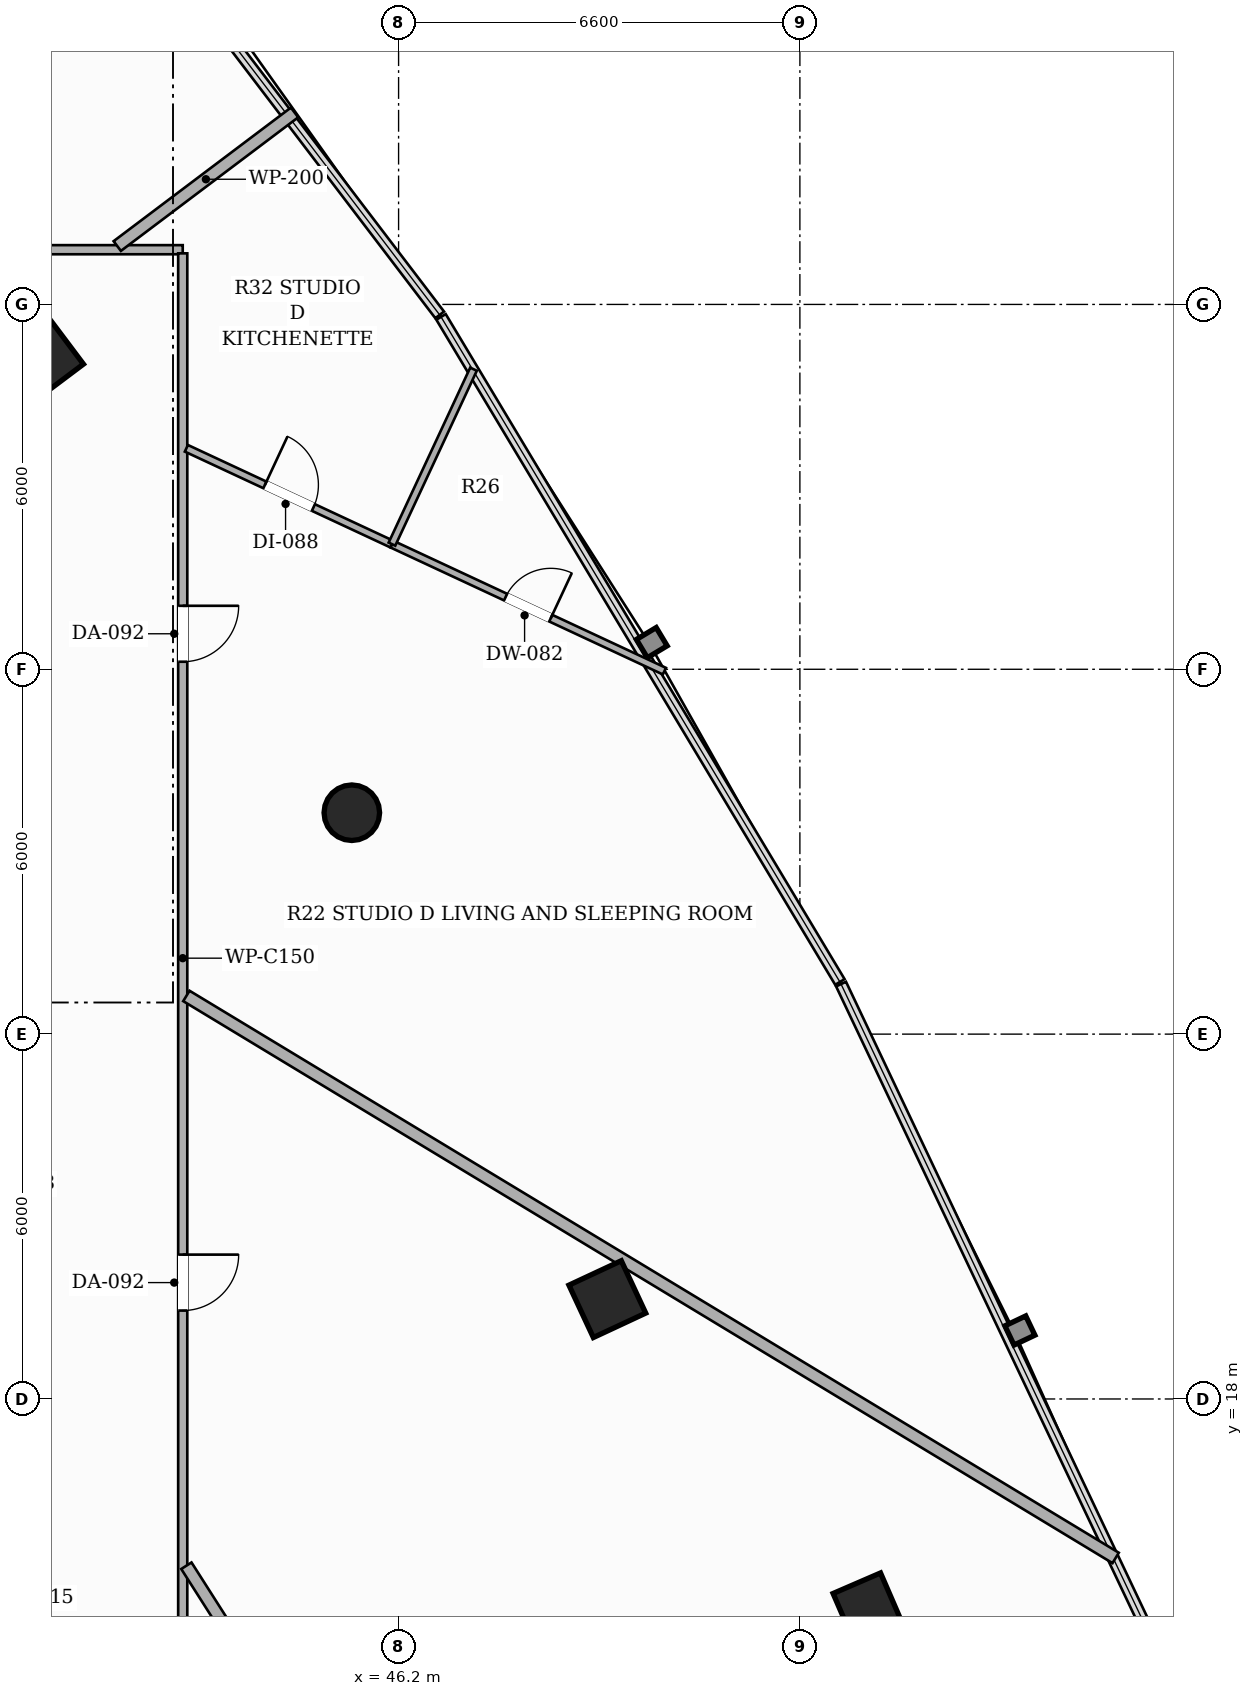
"""IFC4 building model, lengths in metres.
Left out: names, types, materials, properties, quantities, classifications, styles, units other than length and angle.
Written with IfcOpenShell. Run it as: python <this file> out.ifc"""

import sys

from ifc_helpers import new_model, si_unit, direction, frame, frame_2d, origin, origin_2d, place, context, subcontext, project, spatial, rectangle, hollow_rectangle, hollow_circle, extrude, element, fill, save


model = new_model("IFC4")
c1 = context("Model", 3, precision=1e-05, world=origin(), true_north=direction((0.0, 1.0)))
c2 = subcontext(c1, "Body", "Model", "MODEL_VIEW")
j1 = project(units=[si_unit("LENGTHUNIT", "METRE"), si_unit("PLANEANGLEUNIT", "RADIAN")], contexts=[c1])
p1 = place(None, origin())
s1 = spatial("IfcSite", under=j1, at=p1, CompositionType="ELEMENT")
p2 = place(p1, origin())
s2 = spatial("IfcBuilding", under=s1, at=p2, CompositionType="ELEMENT")
p3 = place(p2, frame((0.0, 0.0, 43.4)))
s3 = spatial("IfcBuildingStorey", under=s2, at=p3, CompositionType="ELEMENT", Elevation=43.4)
p4 = place(p3, frame((49.633, 19.642, 0.0), z_axis=(0.0, 0.0, 1.0), x_axis=(-0.422618261741, 0.906307787037, 0.0)))
e1 = element("IfcColumn", 1, at=p4, inside=s3, PredefinedType="COLUMN", context=c2, shape_type="SweptSolid", body=[
    extrude(hollow_rectangle(XDim=0.95, YDim=0.95, WallThickness=0.032, at=origin_2d()), origin(), (0.0, 0.0, 1.0), 3.3),
])
p5 = place(p3, frame((45.431, 27.641, 0.0), z_axis=(0.0, 0.0, 1.0), x_axis=(1.0, 0.0, 0.0)))
e2 = element("IfcColumn", 2, at=p5, inside=s3, PredefinedType="COLUMN", context=c2, shape_type="SweptSolid", body=[
    extrude(hollow_circle(Radius=0.457, WallThickness=0.025, at=origin_2d()), origin(), (0.0, 0.0, 1.0), 3.3),
])
p6 = place(p3, frame((40.352, 35.113, 0.0), z_axis=(0.0, 0.0, 1.0), x_axis=(-0.600420225326, 0.799684658487, 0.0)))
e3 = element("IfcColumn", 3, at=p6, inside=s3, PredefinedType="COLUMN", context=c2, shape_type="SweptSolid", body=[
    extrude(hollow_rectangle(XDim=0.95, YDim=0.95, WallThickness=0.032, at=origin_2d()), origin(), (0.0, 0.0, 1.0), 3.3),
])
p7 = place(p3, frame((53.905, 14.58, 0.0), z_axis=(0.0, 0.0, 1.0), x_axis=(-0.397147890635, 0.917754625684, 0.0)))
e4 = element("IfcColumn", 4, at=p7, inside=s3, PredefinedType="COLUMN", context=c2, shape_type="SweptSolid", body=[
    extrude(hollow_rectangle(XDim=0.85, YDim=0.85, WallThickness=0.028, at=origin_2d()), origin(), (0.0, 0.0, 1.0), 3.3),
])
p8 = place(p3, frame((40.1, 36.9, 0.0), z_axis=(0.0, 0.0, 1.0), x_axis=(1.0, 0.0, 0.0)))
e5 = element("IfcWall", 5, at=p8, inside=s3, PredefinedType="PARTITIONING", context=c2, shape_type="SweptSolid", body=[
    extrude(rectangle(XDim=2.55, YDim=0.15, at=frame_2d((1.275, 0.0))), origin(), (0.0, 0.0, 1.0), 2.413),
])
p9 = place(p3, frame((42.65, 36.84, 0.0), z_axis=(0.0, 0.0, 1.0), x_axis=(0.0, -1.0, 0.0)))
e6 = element("IfcWall", 6, at=p9, inside=s3, PredefinedType="PARTITIONING", context=c2, shape_type="SweptSolid", body=[
    extrude(rectangle(XDim=25.04, YDim=0.15, at=frame_2d((12.52, 0.0))), origin(), (0.0, 0.0, 1.0), 2.413),
])
p10 = place(p9, frame((16.466, 0.0, 0.0)))
e7 = element("IfcOpeningElement", 7, at=p10, cuts=e6, PredefinedType="OPENING", context=c2, shape_type="SweptSolid", body=[
    extrude(rectangle(XDim=0.92, YDim=2.15, at=frame_2d((0.46, 1.075))), frame((0.0, 0.085, 0.0), z_axis=(0.0, -1.0, 0.0), x_axis=(1.0, 0.0, 0.0)), (0.0, 0.0, 1.0), 0.17),
])
p11 = place(p9, frame((5.796, 0.0, 0.0)))
e8 = element("IfcOpeningElement", 8, at=p11, cuts=e6, PredefinedType="OPENING", context=c2, shape_type="SweptSolid", body=[
    extrude(rectangle(XDim=0.92, YDim=2.15, at=frame_2d((0.46, 1.075))), frame((0.0, 0.085, 0.0), z_axis=(0.0, -1.0, 0.0), x_axis=(1.0, 0.0, 0.0)), (0.0, 0.0, 1.0), 0.17),
])
p12 = place(p3, frame((44.489, 39.157, 0.0), z_axis=(0.0, 0.0, 1.0), x_axis=(-0.798682095895, -0.601753196665, 0.0)))
e9 = element("IfcWall", 9, at=p12, inside=s3, PredefinedType="PARTITIONING", context=c2, shape_type="SweptSolid", body=[
    extrude(rectangle(XDim=3.651, YDim=0.2, at=frame_2d((1.826, 0.0))), origin(), (0.0, 0.0, 1.0), 3.06),
])
p13 = place(p3, frame((42.71, 24.628, 0.0), z_axis=(0.0, 0.0, 1.0), x_axis=(0.85570509792, -0.517463801047, 0.0)))
e10 = element("IfcWall", 10, at=p13, inside=s3, PredefinedType="PARTITIONING", context=c2, shape_type="SweptSolid", body=[
    extrude(rectangle(XDim=17.86, YDim=0.2, at=frame_2d((8.93, 0.0))), origin(), (0.0, 0.0, 1.0), 2.413),
])
p14 = place(p3, frame((50.81, 2.544, 0.0), z_axis=(0.0, 0.0, 1.0), x_axis=(-0.537314491885, 0.843381963769, 0.0)))
e11 = element("IfcWall", 11, at=p14, inside=s3, PredefinedType="PARTITIONING", context=c2, shape_type="SweptSolid", body=[
    extrude(rectangle(XDim=15.075, YDim=0.2, at=frame_2d((7.538, 0.0))), origin(), (0.0, 0.0, 1.0), 2.413),
])
p15 = place(p3, frame((46.091, 32.058, 0.0), z_axis=(0.0, 0.0, 1.0), x_axis=(0.906338250566, -0.422552926343, 0.0)))
e12 = element("IfcWall", 12, at=p15, inside=s3, PredefinedType="PARTITIONING", context=c2, shape_type="SweptSolid", body=[
    extrude(rectangle(XDim=4.944, YDim=0.12, at=frame_2d((2.472, 0.0))), origin(), (0.0, 0.0, 1.0), 3.06),
])
p16 = place(p15, frame((2.062, 0.0, 0.0)))
e13 = element("IfcOpeningElement", 13, at=p16, cuts=e12, PredefinedType="OPENING", context=c2, shape_type="SweptSolid", body=[
    extrude(rectangle(XDim=0.82, YDim=2.1, at=frame_2d((0.41, 1.05))), frame((0.0, 0.07, 0.0), z_axis=(0.0, -1.0, 0.0), x_axis=(1.0, 0.0, 0.0)), (0.0, 0.0, 1.0), 0.14),
])
p17 = place(p3, frame((42.71, 33.634, 0.0), z_axis=(0.0, 0.0, 1.0), x_axis=(0.906380338854, -0.422462638985, 0.0)))
e14 = element("IfcWall", 14, at=p17, inside=s3, PredefinedType="PARTITIONING", context=c2, shape_type="SweptSolid", body=[
    extrude(rectangle(XDim=3.73, YDim=0.12, at=frame_2d((1.865, 0.0))), origin(), (0.0, 0.0, 1.0), 3.06),
])
p18 = place(p17, frame((1.425, 0.0, 0.0)))
e15 = element("IfcOpeningElement", 15, at=p18, cuts=e14, PredefinedType="OPENING", context=c2, shape_type="SweptSolid", body=[
    extrude(rectangle(XDim=0.88, YDim=2.1, at=frame_2d((0.44, 1.05))), frame((0.0, 0.07, 0.0), z_axis=(0.0, -1.0, 0.0), x_axis=(1.0, 0.0, 0.0)), (0.0, 0.0, 1.0), 0.14),
])
p19 = place(p3, frame((46.091, 32.058, 0.0), z_axis=(0.0, 0.0, 1.0), x_axis=(0.422430644664, 0.906395250677, 0.0)))
e16 = element("IfcWall", 16, at=p19, inside=s3, PredefinedType="PARTITIONING", context=c2, shape_type="SweptSolid", body=[
    extrude(rectangle(XDim=3.174, YDim=0.12, at=frame_2d((1.587, 0.0))), origin(), (0.0, 0.0, 1.0), 3.06),
])
p20 = place(p10, origin())
e17 = element("IfcDoor", 17, at=p20, inside=s3, OperationType="SINGLE_SWING_LEFT", PredefinedType="DOOR", context=c2, shape_type="SweptSolid", body=[
    extrude(rectangle(XDim=0.92, YDim=2.15, at=frame_2d((0.46, 1.075))), frame((0.0, 0.025, 0.0), z_axis=(0.0, -1.0, 0.0), x_axis=(1.0, 0.0, 0.0)), (0.0, 0.0, 1.0), 0.05),
])
fill(e7, e17)
p21 = place(p11, origin())
e18 = element("IfcDoor", 18, at=p21, inside=s3, OperationType="SINGLE_SWING_LEFT", PredefinedType="DOOR", context=c2, shape_type="SweptSolid", body=[
    extrude(rectangle(XDim=0.92, YDim=2.15, at=frame_2d((0.46, 1.075))), frame((0.0, 0.025, 0.0), z_axis=(0.0, -1.0, 0.0), x_axis=(1.0, 0.0, 0.0)), (0.0, 0.0, 1.0), 0.05),
])
fill(e8, e18)
p22 = place(p16, origin())
e19 = element("IfcDoor", 19, at=p22, inside=s3, OperationType="SINGLE_SWING_RIGHT", PredefinedType="DOOR", context=c2, shape_type="SweptSolid", body=[
    extrude(rectangle(XDim=0.82, YDim=2.1, at=frame_2d((0.41, 1.05))), frame((0.0, 0.025, 0.0), z_axis=(0.0, -1.0, 0.0), x_axis=(1.0, 0.0, 0.0)), (0.0, 0.0, 1.0), 0.05),
])
fill(e13, e19)
p23 = place(p18, origin())
e20 = element("IfcDoor", 20, at=p23, inside=s3, OperationType="SINGLE_SWING_LEFT", PredefinedType="DOOR", context=c2, shape_type="SweptSolid", body=[
    extrude(rectangle(XDim=0.88, YDim=2.1, at=frame_2d((0.44, 1.05))), frame((0.0, 0.025, 0.0), z_axis=(0.0, -1.0, 0.0), x_axis=(1.0, 0.0, 0.0)), (0.0, 0.0, 1.0), 0.05),
])
fill(e15, e20)
save(model, sys.argv[1])
